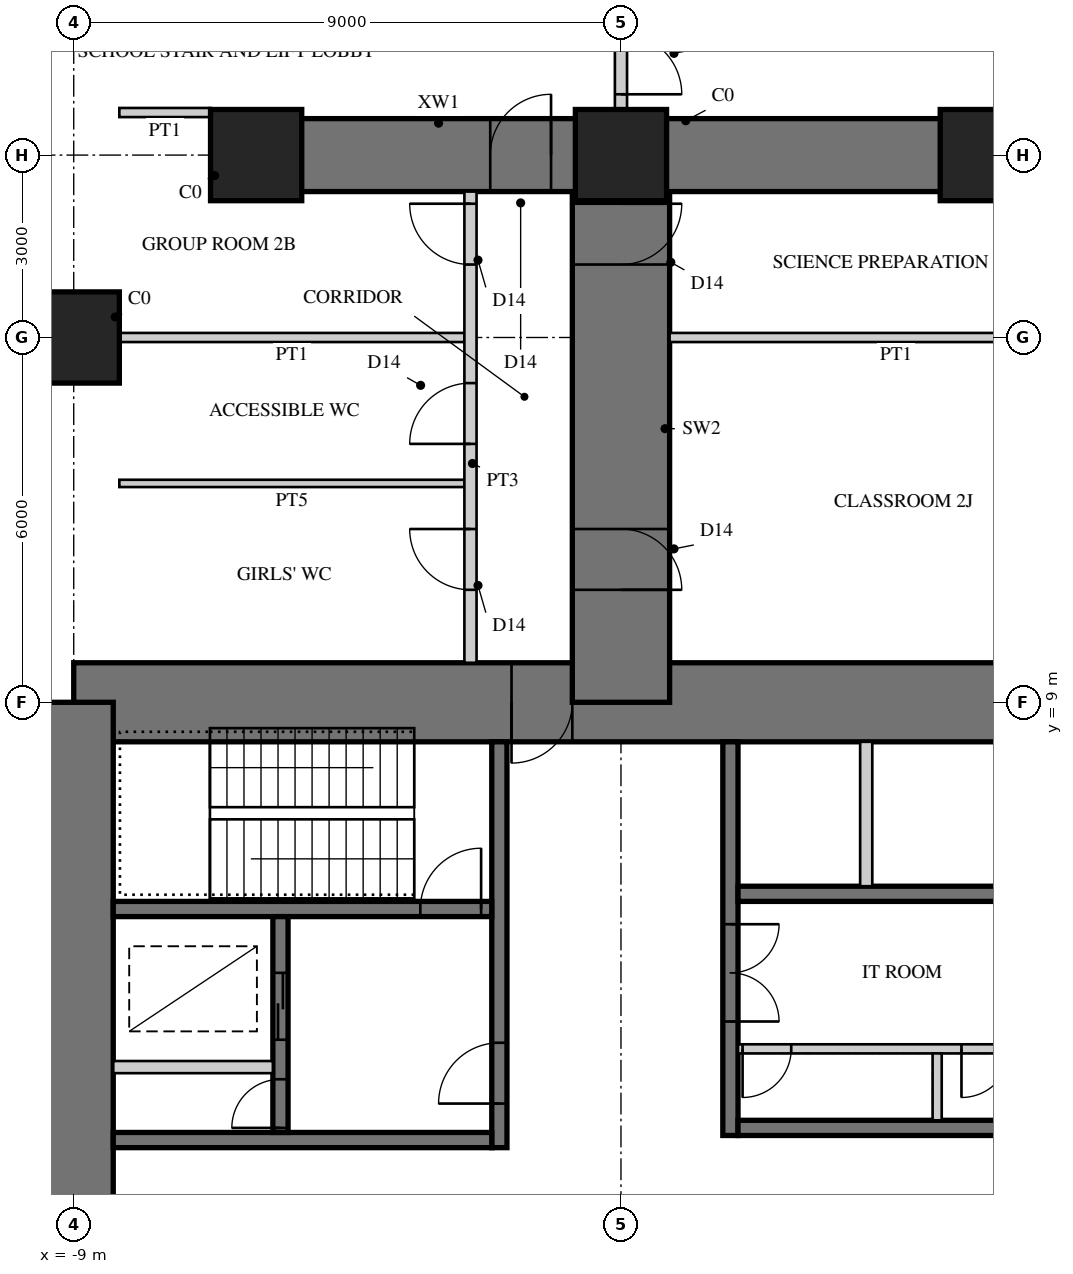
"""IFC4 building model, lengths in metres.
Left out: names, types, materials, properties, quantities, classifications, styles, units other than length and angle.
Written with IfcOpenShell. Run it as: python <this file> out.ifc"""

import sys

from ifc_helpers import new_model, si_unit, direction, frame, frame_2d, origin, origin_2d, place, context, subcontext, project, spatial, rectangle, extrude, element, fill, save


model = new_model("IFC4")
c1 = context("Model", 3, precision=1e-05, world=origin(), true_north=direction((0.0, 1.0)))
c2 = subcontext(c1, "Body", "Model", "MODEL_VIEW")
j1 = project(units=[si_unit("LENGTHUNIT", "METRE"), si_unit("PLANEANGLEUNIT", "RADIAN")], contexts=[c1])
p1 = place(None, origin())
s1 = spatial("IfcSite", under=j1, at=p1, CompositionType="ELEMENT")
p2 = place(p1, origin())
s2 = spatial("IfcBuilding", under=s1, at=p2, CompositionType="ELEMENT")
p3 = place(p2, frame((0.0, 0.0, 9.5)))
s3 = spatial("IfcBuildingStorey", under=s2, at=p3, CompositionType="ELEMENT", Elevation=9.5)
p4 = place(p3, frame((9.0, 9.0, 0.0), z_axis=(0.0, 0.0, 1.0), x_axis=(-1.0, 0.0, 0.0)))
e1 = element("IfcWall", 1, at=p4, inside=s3, PredefinedType="SHEAR", context=c2, shape_type="SweptSolid", body=[
    extrude(rectangle(XDim=18.0, YDim=1.3, at=frame_2d((9.0, 0.0))), origin(), (0.0, 0.0, 1.0), 4.5),
])
p5 = place(p4, frame((9.8, 0.0, 0.0)))
e2 = element("IfcOpeningElement", 2, at=p5, cuts=e1, PredefinedType="OPENING", context=c2, shape_type="SweptSolid", body=[
    extrude(rectangle(XDim=1.0, YDim=2.4, at=frame_2d((0.5, 1.2))), frame((0.0, 0.66, 0.0), z_axis=(0.0, -1.0, 0.0), x_axis=(1.0, 0.0, 0.0)), (0.0, 0.0, 1.0), 1.32),
])
p6 = place(p3, frame((-9.0, 9.0, 0.0), z_axis=(0.0, 0.0, 1.0), x_axis=(0.0, -1.0, 0.0)))
e3 = element("IfcWall", 3, at=p6, inside=s3, PredefinedType="SHEAR", context=c2, shape_type="SweptSolid", body=[
    extrude(rectangle(XDim=18.0, YDim=1.3, at=frame_2d((9.0, 0.0))), origin(), (0.0, 0.0, 1.0), 4.5),
])
p7 = place(p6, frame((9.8, 0.0, 0.0)))
e4 = element("IfcOpeningElement", 4, at=p7, cuts=e3, PredefinedType="OPENING", context=c2, shape_type="SweptSolid", body=[
    extrude(rectangle(XDim=1.0, YDim=2.4, at=frame_2d((0.5, 1.2))), frame((0.0, 0.66, 0.0), z_axis=(0.0, -1.0, 0.0), x_axis=(1.0, 0.0, 0.0)), (0.0, 0.0, 1.0), 1.32),
])
p8 = place(p3, frame((1.8, 1.875, 0.0), z_axis=(0.0, 0.0, 1.0), x_axis=(0.0, 1.0, 0.0)))
e5 = element("IfcWall", 5, at=p8, inside=s3, PredefinedType="SHEAR", context=c2, shape_type="SweptSolid", body=[
    extrude(rectangle(XDim=6.475, YDim=0.25, at=frame_2d((3.238, 0.0))), origin(), (0.0, 0.0, 1.0), 4.5),
])
p9 = place(p8, frame((1.875, 0.0, 0.0)))
e6 = element("IfcOpeningElement", 6, at=p9, cuts=e5, PredefinedType="OPENING", context=c2, shape_type="SweptSolid", body=[
    extrude(rectangle(XDim=1.6, YDim=2.4, at=frame_2d((0.8, 1.2))), frame((0.0, 0.135, 0.0), z_axis=(0.0, -1.0, 0.0), x_axis=(1.0, 0.0, 0.0)), (0.0, 0.0, 1.0), 0.27),
])
for number, where, z_axis, x_axis in (
    (7, (1.925, 2.0, 0.0), (0.0, 0.0, 1.0), (1.0, 0.0, 0.0)),
    (8, (1.925, 5.85, 0.0), (0.0, 0.0, 1.0), (1.0, 0.0, 0.0)),
):
    element("IfcWall", number, at=place(p3, frame(where, z_axis=z_axis, x_axis=x_axis)), inside=s3, PredefinedType="SHEAR", context=c2, shape_type="SweptSolid", body=[
        extrude(rectangle(XDim=6.425, YDim=0.25, at=frame_2d((3.212, 0.0))), origin(), (0.0, 0.0, 1.0), 4.5),
    ])
p10 = place(p3, frame((1.925, 3.3, 0.0), z_axis=(0.0, 0.0, 1.0), x_axis=(1.0, 0.0, 0.0)))
e9 = element("IfcWall", 9, at=p10, inside=s3, PredefinedType="PARTITIONING", context=c2, shape_type="SweptSolid", body=[
    extrude(rectangle(XDim=6.425, YDim=0.15, at=frame_2d((3.212, 0.0))), origin(), (0.0, 0.0, 1.0), 4.5),
])
p11 = place(p10, frame((0.075, 0.0, 0.0)))
e10 = element("IfcOpeningElement", 10, at=p11, cuts=e9, PredefinedType="OPENING", context=c2, shape_type="SweptSolid", body=[
    extrude(rectangle(XDim=0.8, YDim=2.1, at=frame_2d((0.4, 1.05))), frame((0.0, 0.085, 0.0), z_axis=(0.0, -1.0, 0.0), x_axis=(1.0, 0.0, 0.0)), (0.0, 0.0, 1.0), 0.17),
])
p12 = place(p10, frame((3.675, 0.0, 0.0)))
e11 = element("IfcOpeningElement", 11, at=p12, cuts=e9, PredefinedType="OPENING", context=c2, shape_type="SweptSolid", body=[
    extrude(rectangle(XDim=0.8, YDim=2.1, at=frame_2d((0.4, 1.05))), frame((0.0, 0.085, 0.0), z_axis=(0.0, -1.0, 0.0), x_axis=(1.0, 0.0, 0.0)), (0.0, 0.0, 1.0), 0.17),
])
p13 = place(p3, frame((5.2, 2.125, 0.0), z_axis=(0.0, 0.0, 1.0), x_axis=(0.0, 1.0, 0.0)))
e12 = element("IfcWall", 12, at=p13, inside=s3, PredefinedType="PARTITIONING", context=c2, shape_type="SweptSolid", body=[
    extrude(rectangle(XDim=1.1, YDim=0.15, at=frame_2d((0.55, 0.0))), origin(), (0.0, 0.0, 1.0), 4.5),
])
p14 = place(p3, frame((4.033, 5.975, 0.0), z_axis=(0.0, 0.0, 1.0), x_axis=(0.0, 1.0, 0.0)))
e13 = element("IfcWall", 13, at=p14, inside=s3, PredefinedType="PARTITIONING", context=c2, shape_type="SweptSolid", body=[
    extrude(rectangle(XDim=2.375, YDim=0.2, at=frame_2d((1.188, 0.0))), origin(), (0.0, 0.0, 1.0), 4.5),
])
p15 = place(p3, frame((-2.0, 1.675, 0.0), z_axis=(0.0, 0.0, 1.0), x_axis=(0.0, 1.0, 0.0)))
e14 = element("IfcWall", 14, at=p15, inside=s3, PredefinedType="SHEAR", context=c2, shape_type="SweptSolid", body=[
    extrude(rectangle(XDim=6.675, YDim=0.25, at=frame_2d((3.337, 0.0))), origin(), (0.0, 0.0, 1.0), 4.5),
])
p16 = place(p15, frame((0.725, 0.0, 0.0)))
e15 = element("IfcOpeningElement", 15, at=p16, cuts=e14, PredefinedType="OPENING", context=c2, shape_type="SweptSolid", body=[
    extrude(rectangle(XDim=1.0, YDim=2.1, at=frame_2d((0.5, 1.05))), frame((0.0, 0.135, 0.0), z_axis=(0.0, -1.0, 0.0), x_axis=(1.0, 0.0, 0.0)), (0.0, 0.0, 1.0), 0.27),
])
p17 = place(p3, frame((-2.125, 1.8, 0.0), z_axis=(0.0, 0.0, 1.0), x_axis=(-1.0, 0.0, 0.0)))
e16 = element("IfcWall", 16, at=p17, inside=s3, PredefinedType="SHEAR", context=c2, shape_type="SweptSolid", body=[
    extrude(rectangle(XDim=6.225, YDim=0.25, at=frame_2d((3.113, 0.0))), origin(), (0.0, 0.0, 1.0), 4.5),
])
p18 = place(p3, frame((-2.125, 5.6, 0.0), z_axis=(0.0, 0.0, 1.0), x_axis=(-1.0, 0.0, 0.0)))
e17 = element("IfcWall", 17, at=p18, inside=s3, PredefinedType="SHEAR", context=c2, shape_type="SweptSolid", body=[
    extrude(rectangle(XDim=6.225, YDim=0.25, at=frame_2d((3.113, 0.0))), origin(), (0.0, 0.0, 1.0), 4.5),
])
p19 = place(p18, frame((0.175, 0.0, 0.0)))
e18 = element("IfcOpeningElement", 18, at=p19, cuts=e17, PredefinedType="OPENING", context=c2, shape_type="SweptSolid", body=[
    extrude(rectangle(XDim=1.0, YDim=2.1, at=frame_2d((0.5, 1.05))), frame((0.0, 0.135, 0.0), z_axis=(0.0, -1.0, 0.0), x_axis=(1.0, 0.0, 0.0)), (0.0, 0.0, 1.0), 0.27),
])
p20 = place(p3, frame((-5.6, 1.925, 0.0), z_axis=(0.0, 0.0, 1.0), x_axis=(0.0, 1.0, 0.0)))
e19 = element("IfcWall", 19, at=p20, inside=s3, PredefinedType="SHEAR", context=c2, shape_type="SweptSolid", body=[
    extrude(rectangle(XDim=3.55, YDim=0.25, at=frame_2d((1.775, 0.0))), origin(), (0.0, 0.0, 1.0), 4.5),
])
p21 = place(p20, frame((1.525, 0.0, 0.0)))
e20 = element("IfcOpeningElement", 20, at=p21, cuts=e19, PredefinedType="OPENING", context=c2, shape_type="SweptSolid", body=[
    extrude(rectangle(XDim=1.1, YDim=2.2, at=frame_2d((0.55, 1.1))), frame((0.0, 0.135, 0.0), z_axis=(0.0, -1.0, 0.0), x_axis=(1.0, 0.0, 0.0)), (0.0, 0.0, 1.0), 0.27),
])
p22 = place(p20, frame((0.075, 0.0, 0.0)))
e21 = element("IfcOpeningElement", 21, at=p22, cuts=e19, PredefinedType="OPENING", context=c2, shape_type="SweptSolid", body=[
    extrude(rectangle(XDim=0.8, YDim=2.1, at=frame_2d((0.4, 1.05))), frame((0.0, 0.135, 0.0), z_axis=(0.0, -1.0, 0.0), x_axis=(1.0, 0.0, 0.0)), (0.0, 0.0, 1.0), 0.27),
])
p23 = place(p3, frame((-5.725, 3.0, 0.0), z_axis=(0.0, 0.0, 1.0), x_axis=(-1.0, 0.0, 0.0)))
e22 = element("IfcWall", 22, at=p23, inside=s3, PredefinedType="PARTITIONING", context=c2, shape_type="SweptSolid", body=[
    extrude(rectangle(XDim=2.625, YDim=0.2, at=frame_2d((1.312, 0.0))), origin(), (0.0, 0.0, 1.0), 4.5),
])
p24 = place(p3, frame((0.0, 9.0, 0.0), z_axis=(0.0, 0.0, 1.0), x_axis=(0.0, 1.0, 0.0)))
e23 = element("IfcWall", 23, at=p24, inside=s3, PredefinedType="SHEAR", context=c2, shape_type="SweptSolid", body=[
    extrude(rectangle(XDim=9.0, YDim=1.6, at=frame_2d((4.5, 0.0))), origin(), (0.0, 0.0, 1.0), 4.5),
])
p25 = place(p24, frame((1.85, 0.0, 0.0)))
e24 = element("IfcOpeningElement", 24, at=p25, cuts=e23, PredefinedType="OPENING", context=c2, shape_type="SweptSolid", body=[
    extrude(rectangle(XDim=1.0, YDim=2.2, at=frame_2d((0.5, 1.1))), frame((0.0, 0.81, 0.0), z_axis=(0.0, -1.0, 0.0), x_axis=(1.0, 0.0, 0.0)), (0.0, 0.0, 1.0), 1.62),
])
p26 = place(p24, frame((7.2, 0.0, 0.0)))
e25 = element("IfcOpeningElement", 25, at=p26, cuts=e23, PredefinedType="OPENING", context=c2, shape_type="SweptSolid", body=[
    extrude(rectangle(XDim=1.0, YDim=2.2, at=frame_2d((0.5, 1.1))), frame((0.0, 0.81, 0.0), z_axis=(0.0, -1.0, 0.0), x_axis=(1.0, 0.0, 0.0)), (0.0, 0.0, 1.0), 1.62),
])
p27 = place(p3, frame((0.0, 18.0, 0.0), z_axis=(0.0, 0.0, 1.0), x_axis=(-1.0, 0.0, 0.0)))
e26 = element("IfcWall", 26, at=p27, inside=s3, PredefinedType="SHEAR", context=c2, shape_type="SweptSolid", body=[
    extrude(rectangle(XDim=6.0, YDim=1.2, at=frame_2d((3.0, 0.0))), origin(), (0.0, 0.0, 1.0), 4.5),
])
p28 = place(p27, frame((1.15, 0.0, 0.0)))
e27 = element("IfcOpeningElement", 27, at=p28, cuts=e26, PredefinedType="OPENING", context=c2, shape_type="SweptSolid", body=[
    extrude(rectangle(XDim=1.0, YDim=2.2, at=frame_2d((0.5, 1.1))), frame((0.0, 0.61, 0.0), z_axis=(0.0, -1.0, 0.0), x_axis=(1.0, 0.0, 0.0)), (0.0, 0.0, 1.0), 1.22),
])
p29 = place(p3, frame((0.0, 18.0, 0.0), z_axis=(0.0, 0.0, 1.0), x_axis=(1.0, 0.0, 0.0)))
e28 = element("IfcWall", 28, at=p29, inside=s3, PredefinedType="SHEAR", context=c2, shape_type="SweptSolid", body=[
    extrude(rectangle(XDim=6.0, YDim=1.2, at=frame_2d((3.0, 0.0))), origin(), (0.0, 0.0, 1.0), 4.5),
])
for number, where, z_axis, x_axis in (
    (29, (-9.0, 15.0, 0.0), (0.0, 0.0, 1.0), (1.0, 0.0, 0.0)),
    (30, (6.0, 18.0, 0.0), (0.0, 0.0, 1.0), (1.0, 0.0, 0.0)),
    (31, (0.0, 18.0, 0.0), (0.0, 0.0, 1.0), (1.0, 0.0, 0.0)),
    (32, (-6.0, 18.0, 0.0), (0.0, 0.0, 1.0), (1.0, 0.0, 0.0)),
):
    element("IfcColumn", number, at=place(p3, frame(where, z_axis=z_axis, x_axis=x_axis)), inside=s3, PredefinedType="COLUMN", context=c2, shape_type="SweptSolid", body=[
        extrude(rectangle(XDim=1.5, YDim=1.5, at=origin_2d()), origin(), (0.0, 0.0, 1.0), 4.5),
    ])
p30 = place(p3, frame((-2.575, 15.0, 0.0), z_axis=(0.0, 0.0, 1.0), x_axis=(-1.0, 0.0, 0.0)))
e33 = element("IfcWall", 33, at=p30, inside=s3, PredefinedType="PARTITIONING", context=c2, shape_type="SweptSolid", body=[
    extrude(rectangle(XDim=5.675, YDim=0.15, at=frame_2d((2.837, 0.0))), origin(), (0.0, 0.0, 1.0), 3.35),
])
p31 = place(p3, frame((8.25, 15.0, 0.0), z_axis=(0.0, 0.0, 1.0), x_axis=(-1.0, 0.0, 0.0)))
e34 = element("IfcWall", 34, at=p31, inside=s3, PredefinedType="PARTITIONING", context=c2, shape_type="SweptSolid", body=[
    extrude(rectangle(XDim=7.45, YDim=0.15, at=frame_2d((3.725, 0.0))), origin(), (0.0, 0.0, 1.0), 3.35),
])
p32 = place(p3, frame((-2.575, 12.6, 0.0), z_axis=(0.0, 0.0, 1.0), x_axis=(-1.0, 0.0, 0.0)))
e35 = element("IfcWall", 35, at=p32, inside=s3, PredefinedType="PLUMBINGWALL", context=c2, shape_type="SweptSolid", body=[
    extrude(rectangle(XDim=5.675, YDim=0.12, at=frame_2d((2.837, 0.0))), origin(), (0.0, 0.0, 1.0), 4.3),
])
p33 = place(p3, frame((-2.475, 9.65, 0.0), z_axis=(0.0, 0.0, 1.0), x_axis=(0.0, 1.0, 0.0)))
e36 = element("IfcWall", 36, at=p33, inside=s3, PredefinedType="SOLIDWALL", context=c2, shape_type="SweptSolid", body=[
    extrude(rectangle(XDim=7.75, YDim=0.2, at=frame_2d((3.875, 0.0))), origin(), (0.0, 0.0, 1.0), 4.3),
])
p34 = place(p33, frame((1.2, 0.0, 0.0)))
e37 = element("IfcOpeningElement", 37, at=p34, cuts=e36, PredefinedType="OPENING", context=c2, shape_type="SweptSolid", body=[
    extrude(rectangle(XDim=1.0, YDim=2.2, at=frame_2d((0.5, 1.1))), frame((0.0, 0.11, 0.0), z_axis=(0.0, -1.0, 0.0), x_axis=(1.0, 0.0, 0.0)), (0.0, 0.0, 1.0), 0.22),
])
p35 = place(p33, frame((3.6, 0.0, 0.0)))
e38 = element("IfcOpeningElement", 38, at=p35, cuts=e36, PredefinedType="OPENING", context=c2, shape_type="SweptSolid", body=[
    extrude(rectangle(XDim=1.0, YDim=2.2, at=frame_2d((0.5, 1.1))), frame((0.0, 0.11, 0.0), z_axis=(0.0, -1.0, 0.0), x_axis=(1.0, 0.0, 0.0)), (0.0, 0.0, 1.0), 0.22),
])
p36 = place(p33, frame((6.55, 0.0, 0.0)))
e39 = element("IfcOpeningElement", 39, at=p36, cuts=e36, PredefinedType="OPENING", context=c2, shape_type="SweptSolid", body=[
    extrude(rectangle(XDim=1.0, YDim=2.2, at=frame_2d((0.5, 1.1))), frame((0.0, 0.11, 0.0), z_axis=(0.0, -1.0, 0.0), x_axis=(1.0, 0.0, 0.0)), (0.0, 0.0, 1.0), 0.22),
])
p37 = place(p3, frame((-6.75, 18.7, 0.0), z_axis=(0.0, 0.0, 1.0), x_axis=(-1.0, 0.0, 0.0)))
e40 = element("IfcWall", 40, at=p37, inside=s3, PredefinedType="PARTITIONING", context=c2, shape_type="SweptSolid", body=[
    extrude(rectangle(XDim=1.5, YDim=0.15, at=frame_2d((0.75, 0.0))), origin(), (0.0, 0.0, 1.0), 4.3),
])
p38 = place(p3, frame((0.0, 18.0, 0.0), z_axis=(0.0, 0.0, 1.0), x_axis=(0.0, 1.0, 0.0)))
e41 = element("IfcWall", 41, at=p38, inside=s3, PredefinedType="SOLIDWALL", context=c2, shape_type="SweptSolid", body=[
    extrude(rectangle(XDim=3.0, YDim=0.2, at=frame_2d((1.5, 0.0))), origin(), (0.0, 0.0, 1.0), 4.3),
])
p39 = place(p38, frame((1.0, 0.0, 0.0)))
e42 = element("IfcOpeningElement", 42, at=p39, cuts=e41, PredefinedType="OPENING", context=c2, shape_type="SweptSolid", body=[
    extrude(rectangle(XDim=1.0, YDim=2.2, at=frame_2d((0.5, 1.1))), frame((0.0, 0.11, 0.0), z_axis=(0.0, -1.0, 0.0), x_axis=(1.0, 0.0, 0.0)), (0.0, 0.0, 1.0), 0.22),
])
p40 = place(p34, origin())
e43 = element("IfcDoor", 43, at=p40, inside=s3, OperationType="SINGLE_SWING_RIGHT", PredefinedType="DOOR", context=c2, shape_type="SweptSolid", body=[
    extrude(rectangle(XDim=1.0, YDim=2.2, at=frame_2d((0.5, 1.1))), frame((0.0, 0.025, 0.0), z_axis=(0.0, -1.0, 0.0), x_axis=(1.0, 0.0, 0.0)), (0.0, 0.0, 1.0), 0.05),
])
fill(e37, e43)
p41 = place(p35, origin())
e44 = element("IfcDoor", 44, at=p41, inside=s3, OperationType="SINGLE_SWING_LEFT", PredefinedType="DOOR", context=c2, shape_type="SweptSolid", body=[
    extrude(rectangle(XDim=1.0, YDim=2.2, at=frame_2d((0.5, 1.1))), frame((0.0, 0.025, 0.0), z_axis=(0.0, -1.0, 0.0), x_axis=(1.0, 0.0, 0.0)), (0.0, 0.0, 1.0), 0.05),
])
fill(e38, e44)
p42 = place(p36, origin())
e45 = element("IfcDoor", 45, at=p42, inside=s3, OperationType="SINGLE_SWING_RIGHT", PredefinedType="DOOR", context=c2, shape_type="SweptSolid", body=[
    extrude(rectangle(XDim=1.0, YDim=2.2, at=frame_2d((0.5, 1.1))), frame((0.0, 0.025, 0.0), z_axis=(0.0, -1.0, 0.0), x_axis=(1.0, 0.0, 0.0)), (0.0, 0.0, 1.0), 0.05),
])
fill(e39, e45)
p43 = place(p25, frame((1.0, 0.0, 0.0), z_axis=(0.0, 0.0, 1.0), x_axis=(-1.0, 0.0, 0.0)))
e46 = element("IfcDoor", 46, at=p43, inside=s3, OperationType="SINGLE_SWING_RIGHT", PredefinedType="DOOR", context=c2, shape_type="SweptSolid", body=[
    extrude(rectangle(XDim=1.0, YDim=2.2, at=frame_2d((0.5, 1.1))), frame((0.0, 0.025, 0.0), z_axis=(0.0, -1.0, 0.0), x_axis=(1.0, 0.0, 0.0)), (0.0, 0.0, 1.0), 0.05),
])
fill(e24, e46)
p44 = place(p26, frame((1.0, 0.0, 0.0), z_axis=(0.0, 0.0, 1.0), x_axis=(-1.0, 0.0, 0.0)))
e47 = element("IfcDoor", 47, at=p44, inside=s3, OperationType="SINGLE_SWING_LEFT", PredefinedType="DOOR", context=c2, shape_type="SweptSolid", body=[
    extrude(rectangle(XDim=1.0, YDim=2.2, at=frame_2d((0.5, 1.1))), frame((0.0, 0.025, 0.0), z_axis=(0.0, -1.0, 0.0), x_axis=(1.0, 0.0, 0.0)), (0.0, 0.0, 1.0), 0.05),
])
fill(e25, e47)
p45 = place(p39, frame((1.0, 0.0, 0.0), z_axis=(0.0, 0.0, 1.0), x_axis=(-1.0, 0.0, 0.0)))
e48 = element("IfcDoor", 48, at=p45, inside=s3, OperationType="SINGLE_SWING_RIGHT", PredefinedType="DOOR", context=c2, shape_type="SweptSolid", body=[
    extrude(rectangle(XDim=1.0, YDim=2.2, at=frame_2d((0.5, 1.1))), frame((0.0, 0.025, 0.0), z_axis=(0.0, -1.0, 0.0), x_axis=(1.0, 0.0, 0.0)), (0.0, 0.0, 1.0), 0.05),
])
fill(e42, e48)
p46 = place(p28, frame((1.0, 0.0, 0.0), z_axis=(0.0, 0.0, 1.0), x_axis=(-1.0, 0.0, 0.0)))
e49 = element("IfcDoor", 49, at=p46, inside=s3, OperationType="SINGLE_SWING_RIGHT", PredefinedType="DOOR", context=c2, shape_type="SweptSolid", body=[
    extrude(rectangle(XDim=1.0, YDim=2.2, at=frame_2d((0.5, 1.1))), frame((0.0, 0.025, 0.0), z_axis=(0.0, -1.0, 0.0), x_axis=(1.0, 0.0, 0.0)), (0.0, 0.0, 1.0), 0.05),
])
fill(e27, e49)
p47 = place(p5, origin())
e50 = element("IfcDoor", 50, at=p47, inside=s3, OperationType="SINGLE_SWING_RIGHT", PredefinedType="DOOR", context=c2, shape_type="SweptSolid", body=[
    extrude(rectangle(XDim=1.0, YDim=2.4, at=frame_2d((0.5, 1.2))), frame((0.0, 0.055, 0.0), z_axis=(0.0, -1.0, 0.0), x_axis=(1.0, 0.0, 0.0)), (0.0, 0.0, 1.0), 0.05),
])
fill(e2, e50)
p48 = place(p9, frame((1.6, 0.0, 0.0), z_axis=(0.0, 0.0, 1.0), x_axis=(-1.0, 0.0, 0.0)))
e51 = element("IfcDoor", 51, at=p48, inside=s3, OperationType="DOUBLE_DOOR_SINGLE_SWING", PredefinedType="DOOR", context=c2, shape_type="SweptSolid", body=[
    extrude(rectangle(XDim=1.6, YDim=2.4, at=frame_2d((0.8, 1.2))), frame((0.0, 0.025, 0.0), z_axis=(0.0, -1.0, 0.0), x_axis=(1.0, 0.0, 0.0)), (0.0, 0.0, 1.0), 0.05),
])
fill(e6, e51)
p49 = place(p11, frame((0.8, 0.0, 0.0), z_axis=(0.0, 0.0, 1.0), x_axis=(-1.0, 0.0, 0.0)))
e52 = element("IfcDoor", 52, at=p49, inside=s3, OperationType="SINGLE_SWING_RIGHT", PredefinedType="DOOR", context=c2, shape_type="SweptSolid", body=[
    extrude(rectangle(XDim=0.8, YDim=2.1, at=frame_2d((0.4, 1.05))), frame((0.0, 0.025, 0.0), z_axis=(0.0, -1.0, 0.0), x_axis=(1.0, 0.0, 0.0)), (0.0, 0.0, 1.0), 0.05),
])
fill(e10, e52)
p50 = place(p12, frame((0.8, 0.0, 0.0), z_axis=(0.0, 0.0, 1.0), x_axis=(-1.0, 0.0, 0.0)))
e53 = element("IfcDoor", 53, at=p50, inside=s3, OperationType="SINGLE_SWING_RIGHT", PredefinedType="DOOR", context=c2, shape_type="SweptSolid", body=[
    extrude(rectangle(XDim=0.8, YDim=2.1, at=frame_2d((0.4, 1.05))), frame((0.0, 0.025, 0.0), z_axis=(0.0, -1.0, 0.0), x_axis=(1.0, 0.0, 0.0)), (0.0, 0.0, 1.0), 0.05),
])
fill(e11, e53)
p51 = place(p16, origin())
e54 = element("IfcDoor", 54, at=p51, inside=s3, OperationType="SINGLE_SWING_LEFT", PredefinedType="DOOR", context=c2, shape_type="SweptSolid", body=[
    extrude(rectangle(XDim=1.0, YDim=2.1, at=frame_2d((0.5, 1.05))), frame((0.0, 0.025, 0.0), z_axis=(0.0, -1.0, 0.0), x_axis=(1.0, 0.0, 0.0)), (0.0, 0.0, 1.0), 0.05),
])
fill(e15, e54)
p52 = place(p19, frame((1.0, 0.0, 0.0), z_axis=(0.0, 0.0, 1.0), x_axis=(-1.0, 0.0, 0.0)))
e55 = element("IfcDoor", 55, at=p52, inside=s3, OperationType="SINGLE_SWING_RIGHT", PredefinedType="DOOR", context=c2, shape_type="SweptSolid", body=[
    extrude(rectangle(XDim=1.0, YDim=2.1, at=frame_2d((0.5, 1.05))), frame((0.0, 0.025, 0.0), z_axis=(0.0, -1.0, 0.0), x_axis=(1.0, 0.0, 0.0)), (0.0, 0.0, 1.0), 0.05),
])
fill(e18, e55)
p53 = place(p21, origin())
e56 = element("IfcDoor", 56, at=p53, inside=s3, OperationType="DOUBLE_DOOR_SLIDING", PredefinedType="DOOR", context=c2, shape_type="SweptSolid", body=[
    extrude(rectangle(XDim=1.1, YDim=2.2, at=frame_2d((0.55, 1.1))), frame((0.0, 0.025, 0.0), z_axis=(0.0, -1.0, 0.0), x_axis=(1.0, 0.0, 0.0)), (0.0, 0.0, 1.0), 0.05),
])
fill(e20, e56)
p54 = place(p22, origin())
e57 = element("IfcDoor", 57, at=p54, inside=s3, OperationType="SINGLE_SWING_LEFT", PredefinedType="DOOR", context=c2, shape_type="SweptSolid", body=[
    extrude(rectangle(XDim=0.8, YDim=2.1, at=frame_2d((0.4, 1.05))), frame((0.0, 0.025, 0.0), z_axis=(0.0, -1.0, 0.0), x_axis=(1.0, 0.0, 0.0)), (0.0, 0.0, 1.0), 0.05),
])
fill(e21, e57)
save(model, sys.argv[1])
